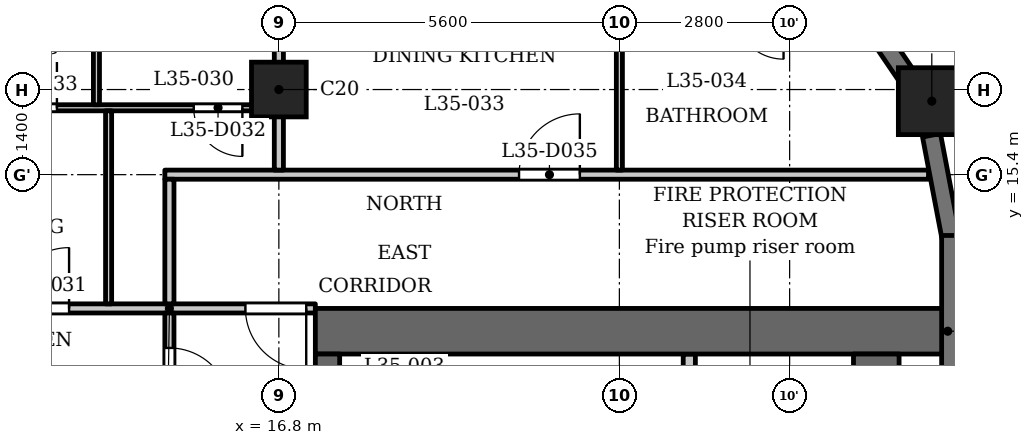
"""IFC4 building model, lengths in metres.
Left out: names, types, materials, properties, quantities, classifications, styles, units other than length and angle.
Written with IfcOpenShell. Run it as: python <this file> out.ifc"""

import sys

from ifc_helpers import new_model, si_unit, direction, frame, frame_2d, origin, origin_2d, place, context, subcontext, project, spatial, rectangle, extrude, element, fill, save


model = new_model("IFC4")
c1 = context("Model", 3, precision=1e-05, world=origin(), true_north=direction((0.0, 1.0)))
c2 = subcontext(c1, "Body", "Model", "MODEL_VIEW")
j1 = project(units=[si_unit("LENGTHUNIT", "METRE"), si_unit("PLANEANGLEUNIT", "RADIAN")], contexts=[c1])
p1 = place(None, origin())
s1 = spatial("IfcSite", under=j1, at=p1, CompositionType="ELEMENT")
p2 = place(p1, origin())
s2 = spatial("IfcBuilding", under=s1, at=p2, CompositionType="ELEMENT")
p3 = place(p2, frame((0.0, 0.0, 139.6)))
s3 = spatial("IfcBuildingStorey", under=s2, at=p3, CompositionType="ELEMENT", Elevation=139.6)
p4 = place(p3, frame((27.538, 16.609, 0.0), z_axis=(0.0, 0.0, 1.0), x_axis=(1.0, 0.0, 0.0)))
e1 = element("IfcColumn", 1, at=p4, inside=s3, PredefinedType="COLUMN", context=c2, shape_type="SweptSolid", body=[
    extrude(rectangle(XDim=1.1, YDim=1.1, at=origin_2d()), origin(), (0.0, 0.0, 1.0), 3.5),
])
p5 = place(p3, frame((16.8, 16.8, 0.0), z_axis=(0.0, 0.0, 1.0), x_axis=(1.0, 0.0, 0.0)))
e2 = element("IfcColumn", 2, at=p5, inside=s3, PredefinedType="COLUMN", context=c2, shape_type="SweptSolid", body=[
    extrude(rectangle(XDim=0.9, YDim=0.9, at=origin_2d()), origin(), (0.0, 0.0, 1.0), 3.5),
])
p6 = place(p3, frame((27.85, 11.75, 0.0), z_axis=(0.0, 0.0, 1.0), x_axis=(0.0, 1.0, 0.0)))
e3 = element("IfcWall", 3, at=p6, inside=s3, PredefinedType="SOLIDWALL", context=c2, shape_type="SweptSolid", body=[
    extrude(rectangle(XDim=2.65, YDim=0.3, at=frame_2d((1.325, 0.0))), origin(), (0.0, 0.0, 1.0), 2.45),
])
p7 = place(p3, frame((27.853, 14.372, 0.0), z_axis=(0.0, 0.0, 1.0), x_axis=(-0.187302784601, 0.982302227871, 0.0)))
e4 = element("IfcWall", 4, at=p7, inside=s3, PredefinedType="SOLIDWALL", context=c2, shape_type="SweptSolid", body=[
    extrude(rectangle(XDim=1.706, YDim=0.3, at=frame_2d((0.853, 0.0))), origin(), (0.0, 0.0, 1.0), 2.45),
])
p8 = place(p3, frame((27.138, 17.002, 0.0), z_axis=(0.0, 0.0, 1.0), x_axis=(-0.562075160946, 0.827086158419, 0.0)))
e5 = element("IfcWall", 5, at=p8, inside=s3, PredefinedType="SOLIDWALL", context=c2, shape_type="SweptSolid", body=[
    extrude(rectangle(XDim=1.706, YDim=0.3, at=frame_2d((0.853, 0.0))), origin(), (0.0, 0.0, 1.0), 2.45),
])
p9 = place(p3, frame((17.4, 12.825, 0.0), z_axis=(0.0, 0.0, 1.0), x_axis=(1.0, 0.0, 0.0)))
e6 = element("IfcWall", 6, at=p9, inside=s3, PredefinedType="SHEAR", context=c2, shape_type="SweptSolid", body=[
    extrude(rectangle(XDim=10.4, YDim=0.75, at=frame_2d((5.2, 0.0))), origin(), (0.0, 0.0, 1.0), 3.2),
])
p10 = place(p3, frame((17.6, -12.45, 0.0), z_axis=(0.0, 0.0, 1.0), x_axis=(0.0, 1.0, 0.0)))
e7 = element("IfcWall", 7, at=p10, inside=s3, PredefinedType="SHEAR", context=c2, shape_type="SweptSolid", body=[
    extrude(rectangle(XDim=24.9, YDim=0.4, at=frame_2d((12.45, 0.0))), origin(), (0.0, 0.0, 1.0), 3.2),
])
p11 = place(p10, frame((8.65, 0.0, 0.0)))
e8 = element("IfcOpeningElement", 8, at=p11, cuts=e7, PredefinedType="OPENING", context=c2, shape_type="SweptSolid", body=[
    extrude(rectangle(XDim=0.9, YDim=2.1, at=frame_2d((0.45, 1.05))), frame((0.0, 0.21, 0.0), z_axis=(0.0, -1.0, 0.0), x_axis=(1.0, 0.0, 0.0)), (0.0, 0.0, 1.0), 0.42),
])
p12 = place(p10, frame((15.6, 0.0, 0.0)))
e9 = element("IfcOpeningElement", 9, at=p12, cuts=e7, PredefinedType="OPENING", context=c2, shape_type="SweptSolid", body=[
    extrude(rectangle(XDim=1.1, YDim=2.1, at=frame_2d((0.55, 1.05))), frame((0.0, 0.21, 0.0), z_axis=(0.0, -1.0, 0.0), x_axis=(1.0, 0.0, 0.0)), (0.0, 0.0, 1.0), 0.42),
])
p13 = place(p10, frame((18.0, 0.0, 0.0)))
e10 = element("IfcOpeningElement", 10, at=p13, cuts=e7, PredefinedType="OPENING", context=c2, shape_type="SweptSolid", body=[
    extrude(rectangle(XDim=1.1, YDim=2.1, at=frame_2d((0.55, 1.05))), frame((0.0, 0.21, 0.0), z_axis=(0.0, -1.0, 0.0), x_axis=(1.0, 0.0, 0.0)), (0.0, 0.0, 1.0), 0.42),
])
p14 = place(p10, frame((23.025, 0.0, 0.0)))
e11 = element("IfcOpeningElement", 11, at=p14, cuts=e7, PredefinedType="OPENING", context=c2, shape_type="SweptSolid", body=[
    extrude(rectangle(XDim=1.1, YDim=2.1, at=frame_2d((0.55, 1.05))), frame((0.0, 0.21, 0.0), z_axis=(0.0, -1.0, 0.0), x_axis=(1.0, 0.0, 0.0)), (0.0, 0.0, 1.0), 0.42),
])
p15 = place(p10, frame((0.775, 0.0, 0.0)))
e12 = element("IfcOpeningElement", 12, at=p15, cuts=e7, PredefinedType="OPENING", context=c2, shape_type="SweptSolid", body=[
    extrude(rectangle(XDim=1.1, YDim=2.1, at=frame_2d((0.55, 1.05))), frame((0.0, 0.21, 0.0), z_axis=(0.0, -1.0, 0.0), x_axis=(1.0, 0.0, 0.0)), (0.0, 0.0, 1.0), 0.42),
])
p16 = place(p10, frame((12.925, 0.0, 0.0)))
e13 = element("IfcOpeningElement", 13, at=p16, cuts=e7, PredefinedType="OPENING", context=c2, shape_type="SweptSolid", body=[
    extrude(rectangle(XDim=1.8, YDim=2.1, at=frame_2d((0.9, 1.05))), frame((0.0, 0.21, 0.0), z_axis=(0.0, -1.0, 0.0), x_axis=(1.0, 0.0, 0.0)), (0.0, 0.0, 1.0), 0.42),
])
p17 = place(p3, frame((26.625, -12.45, 0.0), z_axis=(0.0, 0.0, 1.0), x_axis=(0.0, 1.0, 0.0)))
e14 = element("IfcWall", 14, at=p17, inside=s3, PredefinedType="SHEAR", context=c2, shape_type="SweptSolid", body=[
    extrude(rectangle(XDim=24.9, YDim=0.75, at=frame_2d((12.45, 0.0))), origin(), (0.0, 0.0, 1.0), 3.2),
])
p18 = place(p3, frame((23.55, 9.8, 0.0), z_axis=(0.0, 0.0, 1.0), x_axis=(0.0, 1.0, 0.0)))
e15 = element("IfcWall", 15, at=p18, inside=s3, PredefinedType="PARTITIONING", context=c2, shape_type="SweptSolid", body=[
    extrude(rectangle(XDim=2.65, YDim=0.2, at=frame_2d((1.325, 0.0))), origin(), (0.0, 0.0, 1.0), 3.2),
])
p19 = place(p18, frame((0.875, 0.0, 0.0)))
e16 = element("IfcOpeningElement", 16, at=p19, cuts=e15, PredefinedType="OPENING", context=c2, shape_type="SweptSolid", body=[
    extrude(rectangle(XDim=0.9, YDim=2.1, at=frame_2d((0.45, 1.05))), frame((0.0, 0.11, 0.0), z_axis=(0.0, -1.0, 0.0), x_axis=(1.0, 0.0, 0.0)), (0.0, 0.0, 1.0), 0.22),
])
p20 = place(p3, frame((-17.4, 13.2, 0.0), z_axis=(0.0, 0.0, 1.0), x_axis=(1.0, 0.0, 0.0)))
e17 = element("IfcWall", 17, at=p20, inside=s3, PredefinedType="PARTITIONING", context=c2, shape_type="SweptSolid", body=[
    extrude(rectangle(XDim=34.8, YDim=0.15, at=frame_2d((17.4, 0.0))), origin(), (0.0, 0.0, 1.0), 3.2),
])
p21 = place(p20, frame((0.25, 0.0, 0.0)))
e18 = element("IfcOpeningElement", 18, at=p21, cuts=e17, PredefinedType="OPENING", context=c2, shape_type="SweptSolid", body=[
    extrude(rectangle(XDim=1.0, YDim=2.1, at=frame_2d((0.5, 1.05))), frame((0.0, 0.085, 0.0), z_axis=(0.0, -1.0, 0.0), x_axis=(1.0, 0.0, 0.0)), (0.0, 0.0, 1.0), 0.17),
])
p22 = place(p20, frame((33.65, 0.0, 0.0)))
e19 = element("IfcOpeningElement", 19, at=p22, cuts=e17, PredefinedType="OPENING", context=c2, shape_type="SweptSolid", body=[
    extrude(rectangle(XDim=1.0, YDim=2.1, at=frame_2d((0.5, 1.05))), frame((0.0, 0.085, 0.0), z_axis=(0.0, -1.0, 0.0), x_axis=(1.0, 0.0, 0.0)), (0.0, 0.0, 1.0), 0.17),
])
p23 = place(p20, frame((15.75, 0.0, 0.0)))
e20 = element("IfcOpeningElement", 20, at=p23, cuts=e17, PredefinedType="OPENING", context=c2, shape_type="SweptSolid", body=[
    extrude(rectangle(XDim=1.0, YDim=2.1, at=frame_2d((0.5, 1.05))), frame((0.0, 0.085, 0.0), z_axis=(0.0, -1.0, 0.0), x_axis=(1.0, 0.0, 0.0)), (0.0, 0.0, 1.0), 0.17),
])
p24 = place(p20, frame((19.35, 0.0, 0.0)))
e21 = element("IfcOpeningElement", 21, at=p24, cuts=e17, PredefinedType="OPENING", context=c2, shape_type="SweptSolid", body=[
    extrude(rectangle(XDim=1.0, YDim=2.1, at=frame_2d((0.5, 1.05))), frame((0.0, 0.085, 0.0), z_axis=(0.0, -1.0, 0.0), x_axis=(1.0, 0.0, 0.0)), (0.0, 0.0, 1.0), 0.17),
])
p25 = place(p20, frame((26.95, 0.0, 0.0)))
e22 = element("IfcOpeningElement", 22, at=p25, cuts=e17, PredefinedType="OPENING", context=c2, shape_type="SweptSolid", body=[
    extrude(rectangle(XDim=1.0, YDim=2.1, at=frame_2d((0.5, 1.05))), frame((0.0, 0.085, 0.0), z_axis=(0.0, -1.0, 0.0), x_axis=(1.0, 0.0, 0.0)), (0.0, 0.0, 1.0), 0.17),
])
p26 = place(p20, frame((29.75, 0.0, 0.0)))
e23 = element("IfcOpeningElement", 23, at=p26, cuts=e17, PredefinedType="OPENING", context=c2, shape_type="SweptSolid", body=[
    extrude(rectangle(XDim=1.0, YDim=2.1, at=frame_2d((0.5, 1.05))), frame((0.0, 0.085, 0.0), z_axis=(0.0, -1.0, 0.0), x_axis=(1.0, 0.0, 0.0)), (0.0, 0.0, 1.0), 0.17),
])
p27 = place(p3, frame((14.925, 15.4, 0.0), z_axis=(0.0, 0.0, 1.0), x_axis=(1.0, 0.0, 0.0)))
e24 = element("IfcWall", 24, at=p27, inside=s3, PredefinedType="PARTITIONING", context=c2, shape_type="SweptSolid", body=[
    extrude(rectangle(XDim=12.559, YDim=0.15, at=frame_2d((6.279, 0.0))), origin(), (0.0, 0.0, 1.0), 3.2),
])
p28 = place(p27, frame((5.825, 0.0, 0.0)))
e25 = element("IfcOpeningElement", 25, at=p28, cuts=e24, PredefinedType="OPENING", context=c2, shape_type="SweptSolid", body=[
    extrude(rectangle(XDim=1.0, YDim=2.1, at=frame_2d((0.5, 1.05))), frame((0.0, 0.085, 0.0), z_axis=(0.0, -1.0, 0.0), x_axis=(1.0, 0.0, 0.0)), (0.0, 0.0, 1.0), 0.17),
])
p29 = place(p3, frame((-16.725, 16.5, 0.0), z_axis=(0.0, 0.0, 1.0), x_axis=(1.0, 0.0, 0.0)))
e26 = element("IfcWall", 26, at=p29, inside=s3, PredefinedType="PARTITIONING", context=c2, shape_type="SweptSolid", body=[
    extrude(rectangle(XDim=33.45, YDim=0.1, at=frame_2d((16.725, 0.0))), origin(), (0.0, 0.0, 1.0), 3.2),
])
p30 = place(p29, frame((9.675, 0.0, 0.0)))
e27 = element("IfcOpeningElement", 27, at=p30, cuts=e26, PredefinedType="OPENING", context=c2, shape_type="SweptSolid", body=[
    extrude(rectangle(XDim=0.8, YDim=2.1, at=frame_2d((0.4, 1.05))), frame((0.0, 0.06, 0.0), z_axis=(0.0, -1.0, 0.0), x_axis=(1.0, 0.0, 0.0)), (0.0, 0.0, 1.0), 0.12),
])
p31 = place(p29, frame((3.975, 0.0, 0.0)))
e28 = element("IfcOpeningElement", 28, at=p31, cuts=e26, PredefinedType="OPENING", context=c2, shape_type="SweptSolid", body=[
    extrude(rectangle(XDim=0.9, YDim=2.1, at=frame_2d((0.45, 1.05))), frame((0.0, 0.06, 0.0), z_axis=(0.0, -1.0, 0.0), x_axis=(1.0, 0.0, 0.0)), (0.0, 0.0, 1.0), 0.12),
])
p32 = place(p29, frame((12.025, 0.0, 0.0)))
e29 = element("IfcOpeningElement", 29, at=p32, cuts=e26, PredefinedType="OPENING", context=c2, shape_type="SweptSolid", body=[
    extrude(rectangle(XDim=0.8, YDim=2.1, at=frame_2d((0.4, 1.05))), frame((0.0, 0.06, 0.0), z_axis=(0.0, -1.0, 0.0), x_axis=(1.0, 0.0, 0.0)), (0.0, 0.0, 1.0), 0.12),
])
p33 = place(p29, frame((15.175, 0.0, 0.0)))
e30 = element("IfcOpeningElement", 30, at=p33, cuts=e26, PredefinedType="OPENING", context=c2, shape_type="SweptSolid", body=[
    extrude(rectangle(XDim=0.9, YDim=2.1, at=frame_2d((0.45, 1.05))), frame((0.0, 0.06, 0.0), z_axis=(0.0, -1.0, 0.0), x_axis=(1.0, 0.0, 0.0)), (0.0, 0.0, 1.0), 0.12),
])
p34 = place(p29, frame((20.975, 0.0, 0.0)))
e31 = element("IfcOpeningElement", 31, at=p34, cuts=e26, PredefinedType="OPENING", context=c2, shape_type="SweptSolid", body=[
    extrude(rectangle(XDim=0.8, YDim=2.1, at=frame_2d((0.4, 1.05))), frame((0.0, 0.06, 0.0), z_axis=(0.0, -1.0, 0.0), x_axis=(1.0, 0.0, 0.0)), (0.0, 0.0, 1.0), 0.12),
])
p35 = place(p29, frame((18.175, 0.0, 0.0)))
e32 = element("IfcOpeningElement", 32, at=p35, cuts=e26, PredefinedType="OPENING", context=c2, shape_type="SweptSolid", body=[
    extrude(rectangle(XDim=0.9, YDim=2.1, at=frame_2d((0.45, 1.05))), frame((0.0, 0.06, 0.0), z_axis=(0.0, -1.0, 0.0), x_axis=(1.0, 0.0, 0.0)), (0.0, 0.0, 1.0), 0.12),
])
p36 = place(p29, frame((23.725, 0.0, 0.0)))
e33 = element("IfcOpeningElement", 33, at=p36, cuts=e26, PredefinedType="OPENING", context=c2, shape_type="SweptSolid", body=[
    extrude(rectangle(XDim=0.8, YDim=2.1, at=frame_2d((0.4, 1.05))), frame((0.0, 0.06, 0.0), z_axis=(0.0, -1.0, 0.0), x_axis=(1.0, 0.0, 0.0)), (0.0, 0.0, 1.0), 0.12),
])
p37 = place(p29, frame((26.125, 0.0, 0.0)))
e34 = element("IfcOpeningElement", 34, at=p37, cuts=e26, PredefinedType="OPENING", context=c2, shape_type="SweptSolid", body=[
    extrude(rectangle(XDim=0.9, YDim=2.1, at=frame_2d((0.45, 1.05))), frame((0.0, 0.06, 0.0), z_axis=(0.0, -1.0, 0.0), x_axis=(1.0, 0.0, 0.0)), (0.0, 0.0, 1.0), 0.12),
])
p38 = place(p29, frame((32.125, 0.0, 0.0)))
e35 = element("IfcOpeningElement", 35, at=p38, cuts=e26, PredefinedType="OPENING", context=c2, shape_type="SweptSolid", body=[
    extrude(rectangle(XDim=0.8, YDim=2.1, at=frame_2d((0.4, 1.05))), frame((0.0, 0.06, 0.0), z_axis=(0.0, -1.0, 0.0), x_axis=(1.0, 0.0, 0.0)), (0.0, 0.0, 1.0), 0.12),
])
p39 = place(p29, frame((28.975, 0.0, 0.0)))
e36 = element("IfcOpeningElement", 36, at=p39, cuts=e26, PredefinedType="OPENING", context=c2, shape_type="SweptSolid", body=[
    extrude(rectangle(XDim=0.9, YDim=2.1, at=frame_2d((0.45, 1.05))), frame((0.0, 0.06, 0.0), z_axis=(0.0, -1.0, 0.0), x_axis=(1.0, 0.0, 0.0)), (0.0, 0.0, 1.0), 0.12),
])
p40 = place(p3, frame((13.8, 16.55, 0.0), z_axis=(0.0, 0.0, 1.0), x_axis=(0.0, 1.0, 0.0)))
e37 = element("IfcWall", 37, at=p40, inside=s3, PredefinedType="PARTITIONING", context=c2, shape_type="SweptSolid", body=[
    extrude(rectangle(XDim=5.53, YDim=0.1, at=frame_2d((2.765, 0.0))), origin(), (0.0, 0.0, 1.0), 3.2),
])
p41 = place(p40, frame((4.35, 0.0, 0.0)))
e38 = element("IfcOpeningElement", 38, at=p41, cuts=e37, PredefinedType="OPENING", context=c2, shape_type="SweptSolid", body=[
    extrude(rectangle(XDim=0.9, YDim=2.1, at=frame_2d((0.45, 1.05))), frame((0.0, 0.06, 0.0), z_axis=(0.0, -1.0, 0.0), x_axis=(1.0, 0.0, 0.0)), (0.0, 0.0, 1.0), 0.12),
])
p42 = place(p3, frame((14.0, 13.275, 0.0), z_axis=(0.0, 0.0, 1.0), x_axis=(0.0, 1.0, 0.0)))
e39 = element("IfcWall", 39, at=p42, inside=s3, PredefinedType="PARTITIONING", context=c2, shape_type="SweptSolid", body=[
    extrude(rectangle(XDim=3.175, YDim=0.1, at=frame_2d((1.587, 0.0))), origin(), (0.0, 0.0, 1.0), 3.2),
])
p43 = place(p3, frame((15.0, 6.769, 0.0), z_axis=(0.0, 0.0, 1.0), x_axis=(0.0, 1.0, 0.0)))
e40 = element("IfcWall", 40, at=p43, inside=s3, PredefinedType="PARTITIONING", context=c2, shape_type="SweptSolid", body=[
    extrude(rectangle(XDim=6.356, YDim=0.15, at=frame_2d((3.178, 0.0))), origin(), (0.0, 0.0, 1.0), 3.2),
])
p44 = place(p43, frame((4.781, 0.0, 0.0)))
e41 = element("IfcOpeningElement", 41, at=p44, cuts=e40, PredefinedType="OPENING", context=c2, shape_type="SweptSolid", body=[
    extrude(rectangle(XDim=1.0, YDim=2.1, at=frame_2d((0.5, 1.05))), frame((0.0, 0.085, 0.0), z_axis=(0.0, -1.0, 0.0), x_axis=(1.0, 0.0, 0.0)), (0.0, 0.0, 1.0), 0.17),
])
p45 = place(p3, frame((15.0, 13.275, 0.0), z_axis=(0.0, 0.0, 1.0), x_axis=(0.0, 1.0, 0.0)))
e42 = element("IfcWall", 42, at=p45, inside=s3, PredefinedType="PARTITIONING", context=c2, shape_type="SweptSolid", body=[
    extrude(rectangle(XDim=2.05, YDim=0.15, at=frame_2d((1.025, 0.0))), origin(), (0.0, 0.0, 1.0), 3.2),
])
p46 = place(p3, frame((16.8, 15.475, 0.0), z_axis=(0.0, 0.0, 1.0), x_axis=(0.0, 1.0, 0.0)))
e43 = element("IfcWall", 43, at=p46, inside=s3, PredefinedType="PARTITIONING", context=c2, shape_type="SweptSolid", body=[
    extrude(rectangle(XDim=7.455, YDim=0.15, at=frame_2d((3.728, 0.0))), origin(), (0.0, 0.0, 1.0), 3.2),
])
p47 = place(p3, frame((22.4, 15.475, 0.0), z_axis=(0.0, 0.0, 1.0), x_axis=(0.0, 1.0, 0.0)))
e44 = element("IfcWall", 44, at=p47, inside=s3, PredefinedType="PARTITIONING", context=c2, shape_type="SweptSolid", body=[
    extrude(rectangle(XDim=2.575, YDim=0.1, at=frame_2d((1.288, 0.0))), origin(), (0.0, 0.0, 1.0), 3.2),
])
p48 = place(p44, origin())
e45 = element("IfcDoor", 45, at=p48, inside=s3, OperationType="SINGLE_SWING_LEFT", PredefinedType="DOOR", context=c2, shape_type="SweptSolid", body=[
    extrude(rectangle(XDim=1.0, YDim=2.1, at=frame_2d((0.5, 1.05))), frame((0.0, 0.025, 0.0), z_axis=(0.0, -1.0, 0.0), x_axis=(1.0, 0.0, 0.0)), (0.0, 0.0, 1.0), 0.05),
])
fill(e41, e45)
p49 = place(p22, origin())
e46 = element("IfcDoor", 46, at=p49, inside=s3, OperationType="SINGLE_SWING_RIGHT", PredefinedType="DOOR", context=c2, shape_type="SweptSolid", body=[
    extrude(rectangle(XDim=1.0, YDim=2.1, at=frame_2d((0.5, 1.05))), frame((0.0, 0.025, 0.0), z_axis=(0.0, -1.0, 0.0), x_axis=(1.0, 0.0, 0.0)), (0.0, 0.0, 1.0), 0.05),
])
fill(e19, e46)
p50 = place(p26, origin())
e47 = element("IfcDoor", 47, at=p50, inside=s3, OperationType="SINGLE_SWING_LEFT", PredefinedType="DOOR", context=c2, shape_type="SweptSolid", body=[
    extrude(rectangle(XDim=1.0, YDim=2.1, at=frame_2d((0.5, 1.05))), frame((0.0, 0.025, 0.0), z_axis=(0.0, -1.0, 0.0), x_axis=(1.0, 0.0, 0.0)), (0.0, 0.0, 1.0), 0.05),
])
fill(e23, e47)
p51 = place(p38, origin())
e48 = element("IfcDoor", 48, at=p51, inside=s3, OperationType="SINGLE_SWING_RIGHT", PredefinedType="DOOR", context=c2, shape_type="SweptSolid", body=[
    extrude(rectangle(XDim=0.8, YDim=2.1, at=frame_2d((0.4, 1.05))), frame((0.0, 0.025, 0.0), z_axis=(0.0, -1.0, 0.0), x_axis=(1.0, 0.0, 0.0)), (0.0, 0.0, 1.0), 0.05),
])
fill(e35, e48)
p52 = place(p39, origin())
e49 = element("IfcDoor", 49, at=p52, inside=s3, OperationType="SINGLE_SWING_LEFT", PredefinedType="DOOR", context=c2, shape_type="SweptSolid", body=[
    extrude(rectangle(XDim=0.9, YDim=2.1, at=frame_2d((0.45, 1.05))), frame((0.0, 0.025, 0.0), z_axis=(0.0, -1.0, 0.0), x_axis=(1.0, 0.0, 0.0)), (0.0, 0.0, 1.0), 0.05),
])
fill(e36, e49)
p53 = place(p28, origin())
e50 = element("IfcDoor", 50, at=p53, inside=s3, OperationType="SINGLE_SWING_LEFT", PredefinedType="DOOR", context=c2, shape_type="SweptSolid", body=[
    extrude(rectangle(XDim=1.0, YDim=2.1, at=frame_2d((0.5, 1.05))), frame((0.0, 0.025, 0.0), z_axis=(0.0, -1.0, 0.0), x_axis=(1.0, 0.0, 0.0)), (0.0, 0.0, 1.0), 0.05),
])
fill(e25, e50)
save(model, sys.argv[1])
